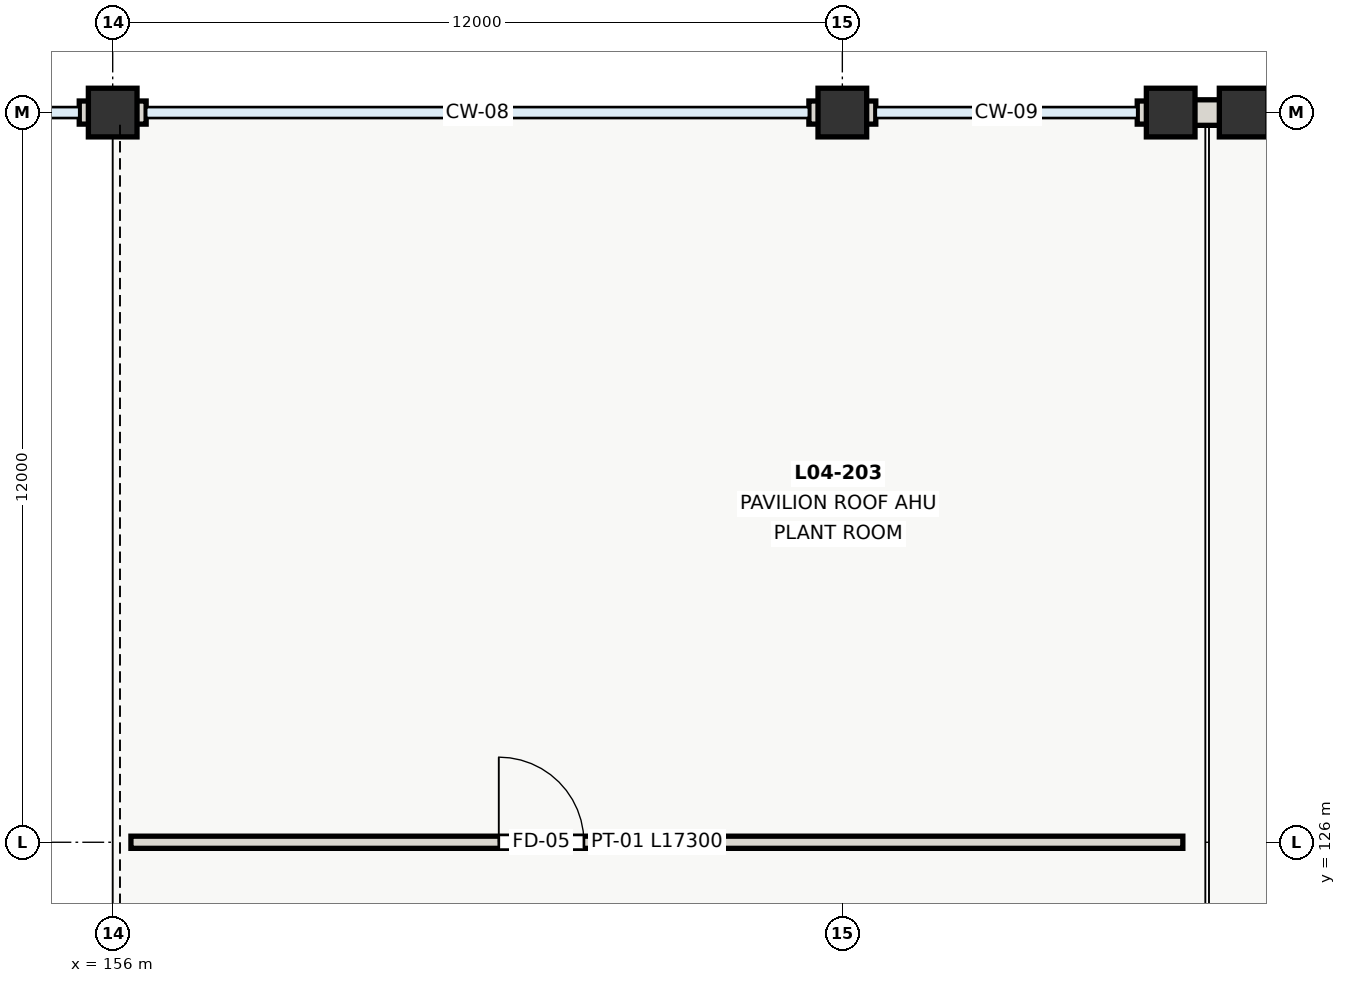
"""IFC4 building model, lengths in metres.
Left out: names, types, materials, properties, quantities, classifications, styles, units other than length and angle.
Written with IfcOpenShell. Run it as: python <this file> out.ifc"""

import sys

from ifc_helpers import new_model, si_unit, direction, frame, frame_2d, origin, origin_2d, place, context, subcontext, project, spatial, rectangle, extrude, element, fill, save


model = new_model("IFC4")
c1 = context("Model", 3, precision=1e-05, world=origin(), true_north=direction((0.0, 1.0)))
c2 = subcontext(c1, "Body", "Model", "MODEL_VIEW")
j1 = project(units=[si_unit("LENGTHUNIT", "METRE"), si_unit("PLANEANGLEUNIT", "RADIAN")], contexts=[c1])
p1 = place(None, origin())
s1 = spatial("IfcSite", under=j1, at=p1, CompositionType="ELEMENT")
p2 = place(p1, origin())
s2 = spatial("IfcBuilding", under=s1, at=p2, CompositionType="ELEMENT")
p3 = place(p2, frame((0.0, 0.0, 12.6)))
s3 = spatial("IfcBuildingStorey", under=s2, at=p3, CompositionType="ELEMENT", Elevation=12.6)
for number, where, z_axis, x_axis in (
    (1, (156.0, 138.0, 0.0), (0.0, 0.0, 1.0), (1.0, 0.0, 0.0)),
    (2, (168.0, 138.0, 0.0), (0.0, 0.0, 1.0), (1.0, 0.0, 0.0)),
    (3, (173.4, 138.0, 0.0), (0.0, 0.0, 1.0), (1.0, 0.0, 0.0)),
    (4, (174.6, 138.0, 0.0), (0.0, 0.0, 1.0), (1.0, 0.0, 0.0)),
):
    element("IfcColumn", number, at=place(p3, frame(where, z_axis=z_axis, x_axis=x_axis)), inside=s3, PredefinedType="COLUMN", context=c2, shape_type="SweptSolid", body=[
        extrude(rectangle(XDim=0.8, YDim=0.8, at=origin_2d()), origin(), (0.0, 0.0, 1.0), 4.8),
    ])
p4 = place(p3, frame((155.45, 138.0, 1.8), z_axis=(0.0, 0.0, 1.0), x_axis=(1.0, 0.0, 0.0)))
e5 = element("IfcWall", 5, at=p4, inside=s3, PredefinedType="SOLIDWALL", context=c2, shape_type="SweptSolid", body=[
    extrude(rectangle(XDim=0.55, YDim=0.38, at=frame_2d((0.275, 0.0))), origin(), (0.0, 0.0, 1.0), 1.75),
])
p5 = place(p3, frame((156.002, 138.0, 1.8), z_axis=(0.0, 0.0, 1.0), x_axis=(1.0, 0.0, 0.0)))
e6 = element("IfcWall", 6, at=p5, inside=s3, PredefinedType="SOLIDWALL", context=c2, shape_type="SweptSolid", body=[
    extrude(rectangle(XDim=0.548, YDim=0.38, at=frame_2d((0.274, 0.0))), origin(), (0.0, 0.0, 1.0), 1.75),
])
p6 = place(p3, frame((167.45, 138.0, 1.8), z_axis=(0.0, 0.0, 1.0), x_axis=(1.0, 0.0, 0.0)))
e7 = element("IfcWall", 7, at=p6, inside=s3, PredefinedType="SOLIDWALL", context=c2, shape_type="SweptSolid", body=[
    extrude(rectangle(XDim=0.55, YDim=0.38, at=frame_2d((0.275, 0.0))), origin(), (0.0, 0.0, 1.0), 1.75),
])
p7 = place(p3, frame((168.002, 138.0, 1.8), z_axis=(0.0, 0.0, 1.0), x_axis=(1.0, 0.0, 0.0)))
e8 = element("IfcWall", 8, at=p7, inside=s3, PredefinedType="SOLIDWALL", context=c2, shape_type="SweptSolid", body=[
    extrude(rectangle(XDim=0.548, YDim=0.38, at=frame_2d((0.274, 0.0))), origin(), (0.0, 0.0, 1.0), 1.75),
])
for number, where, z_axis, x_axis in (
    (9, (172.85, 138.0, 1.8), (0.0, 0.0, 1.0), (1.0, 0.0, 0.0)),
    (10, (174.602, 138.0, 1.8), (0.0, 0.0, 1.0), (1.0, 0.0, 0.0)),
):
    element("IfcWall", number, at=place(p3, frame(where, z_axis=z_axis, x_axis=x_axis)), inside=s3, PredefinedType="SOLIDWALL", context=c2, shape_type="SweptSolid", body=[
        extrude(rectangle(XDim=0.548, YDim=0.38, at=frame_2d((0.274, 0.0))), origin(), (0.0, 0.0, 1.0), 1.75),
    ])
p8 = place(p3, frame((173.4, 138.0, 1.8), z_axis=(0.0, 0.0, 1.0), x_axis=(1.0, 0.0, 0.0)))
e11 = element("IfcWall", 11, at=p8, inside=s3, PredefinedType="SOLIDWALL", context=c2, shape_type="SweptSolid", body=[
    extrude(rectangle(XDim=1.2, YDim=0.42, at=frame_2d((0.6, 0.0))), origin(), (0.0, 0.0, 1.0), 2.4),
])
p9 = place(p3, frame((156.3, 126.0, 0.0), z_axis=(0.0, 0.0, 1.0), x_axis=(1.0, 0.0, 0.0)))
e12 = element("IfcWall", 12, at=p9, inside=s3, PredefinedType="PARTITIONING", context=c2, shape_type="SweptSolid", body=[
    extrude(rectangle(XDim=17.3, YDim=0.2, at=frame_2d((8.65, 0.0))), origin(), (0.0, 0.0, 1.0), 3.78),
])
p10 = place(p9, frame((6.05, 0.0, 0.0)))
e13 = element("IfcOpeningElement", 13, at=p10, cuts=e12, PredefinedType="OPENING", context=c2, shape_type="SweptSolid", body=[
    extrude(rectangle(XDim=1.4, YDim=2.15, at=frame_2d((0.7, 1.075))), frame((0.0, 0.11, 0.0), z_axis=(0.0, -1.0, 0.0), x_axis=(1.0, 0.0, 0.0)), (0.0, 0.0, 1.0), 0.22),
])
p11 = place(p10, origin())
e14 = element("IfcDoor", 14, at=p11, inside=s3, OperationType="SINGLE_SWING_LEFT", PredefinedType="DOOR", context=c2, shape_type="SweptSolid", body=[
    extrude(rectangle(XDim=1.4, YDim=2.15, at=frame_2d((0.7, 1.075))), frame((0.0, 0.025, 0.0), z_axis=(0.0, -1.0, 0.0), x_axis=(1.0, 0.0, 0.0)), (0.0, 0.0, 1.0), 0.05),
])
fill(e13, e14)
save(model, sys.argv[1])
